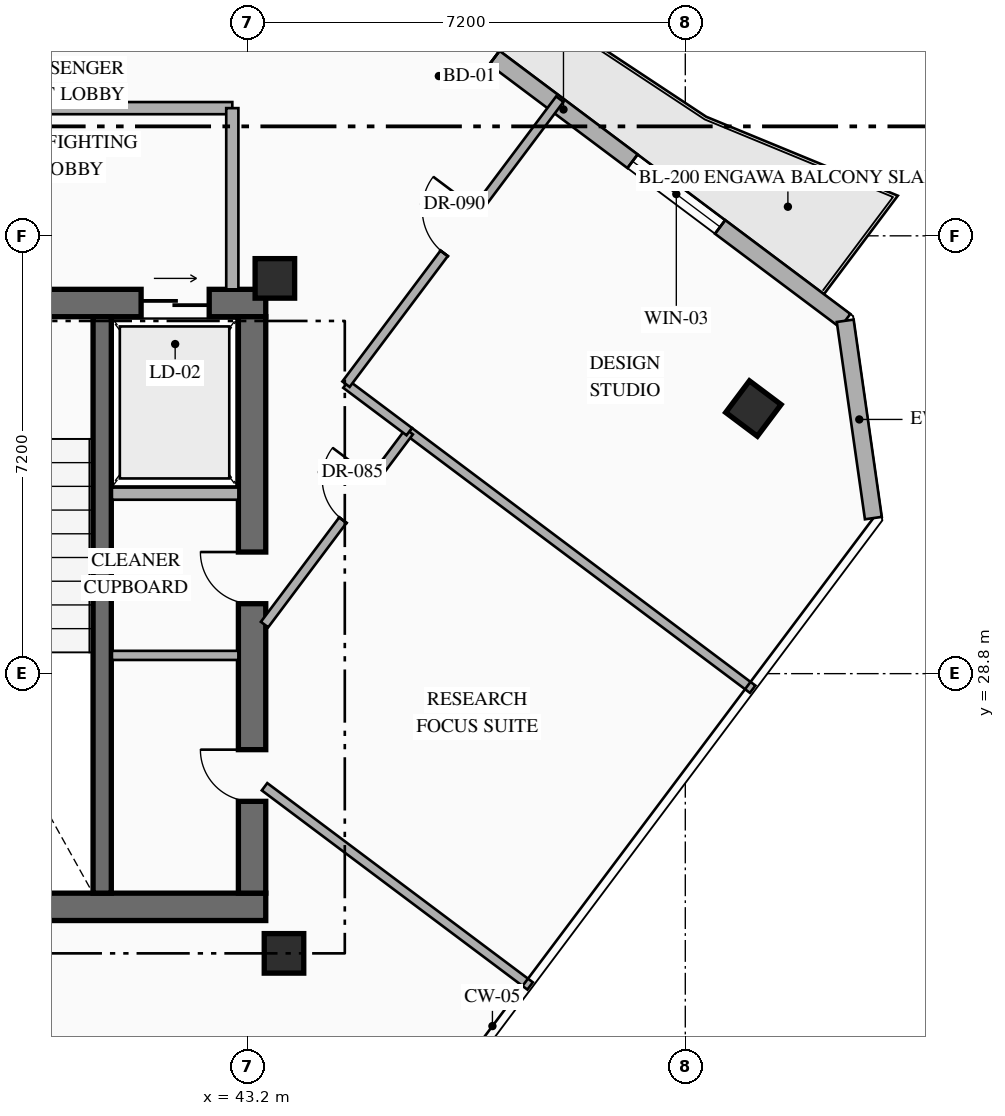
"""IFC4 building model, lengths in metres.
Left out: names, types, materials, properties, quantities, classifications, styles, units other than length and angle.
Written with IfcOpenShell. Run it as: python <this file> out.ifc"""

import sys

from ifc_helpers import new_model, si_unit, direction, frame, frame_2d, origin, origin_2d, place, context, subcontext, project, spatial, rectangle, hollow_rectangle, extrude, element, fill, save


model = new_model("IFC4")
c1 = context("Model", 3, precision=1e-05, world=origin(), true_north=direction((0.0, 1.0)))
c2 = subcontext(c1, "Body", "Model", "MODEL_VIEW")
j1 = project(units=[si_unit("LENGTHUNIT", "METRE"), si_unit("PLANEANGLEUNIT", "RADIAN")], contexts=[c1])
p1 = place(None, origin())
s1 = spatial("IfcSite", under=j1, at=p1, CompositionType="ELEMENT")
p2 = place(p1, origin())
s2 = spatial("IfcBuilding", under=s1, at=p2, CompositionType="ELEMENT")
p3 = place(p2, frame((0.0, 0.0, 253.95)))
s3 = spatial("IfcBuildingStorey", under=s2, at=p3, CompositionType="ELEMENT", Elevation=253.95)
p4 = place(p3, frame((36.04, 24.965, 0.0), z_axis=(0.0, 0.0, 1.0), x_axis=(1.0, 0.0, 0.0)))
e1 = element("IfcWall", 1, at=p4, inside=s3, PredefinedType="SHEAR", context=c2, shape_type="SweptSolid", body=[
    extrude(rectangle(XDim=7.46, YDim=0.45, at=frame_2d((3.73, 0.0))), origin(), (0.0, 0.0, 1.0), 3.6),
])
p5 = place(p3, frame((36.04, 34.895, 0.0), z_axis=(0.0, 0.0, 1.0), x_axis=(1.0, 0.0, 0.0)))
e2 = element("IfcWall", 2, at=p5, inside=s3, PredefinedType="SHEAR", context=c2, shape_type="SweptSolid", body=[
    extrude(rectangle(XDim=7.46, YDim=0.45, at=frame_2d((3.73, 0.0))), origin(), (0.0, 0.0, 1.0), 3.6),
])
p6 = place(p5, frame((2.51, 0.0, 0.0)))
e3 = element("IfcOpeningElement", 3, at=p6, cuts=e2, PredefinedType="OPENING", context=c2, shape_type="SweptSolid", body=[
    extrude(rectangle(XDim=1.1, YDim=2.2, at=frame_2d((0.55, 1.1))), frame((0.0, 0.235, 0.0), z_axis=(0.0, -1.0, 0.0), x_axis=(1.0, 0.0, 0.0)), (0.0, 0.0, 1.0), 0.47),
])
p7 = place(p5, frame((5.41, 0.0, 0.0)))
e4 = element("IfcOpeningElement", 4, at=p7, cuts=e2, PredefinedType="OPENING", context=c2, shape_type="SweptSolid", body=[
    extrude(rectangle(XDim=1.12, YDim=2.15, at=frame_2d((0.56, 1.075))), frame((0.0, 0.235, 0.0), z_axis=(0.0, -1.0, 0.0), x_axis=(1.0, 0.0, 0.0)), (0.0, 0.0, 1.0), 0.47),
])
p8 = place(p3, frame((43.275, 25.19, 0.0), z_axis=(0.0, 0.0, 1.0), x_axis=(0.0, 1.0, 0.0)))
e5 = element("IfcWall", 5, at=p8, inside=s3, PredefinedType="SHEAR", context=c2, shape_type="SweptSolid", body=[
    extrude(rectangle(XDim=9.48, YDim=0.45, at=frame_2d((4.74, 0.0))), origin(), (0.0, 0.0, 1.0), 3.6),
])
p9 = place(p8, frame((1.51, 0.0, 0.0)))
e6 = element("IfcOpeningElement", 6, at=p9, cuts=e5, PredefinedType="OPENING", context=c2, shape_type="SweptSolid", body=[
    extrude(rectangle(XDim=0.85, YDim=2.08, at=frame_2d((0.425, 1.04))), frame((0.0, 0.235, 0.0), z_axis=(0.0, -1.0, 0.0), x_axis=(1.0, 0.0, 0.0)), (0.0, 0.0, 1.0), 0.47),
])
p10 = place(p8, frame((4.76, 0.0, 0.0)))
e7 = element("IfcOpeningElement", 7, at=p10, cuts=e5, PredefinedType="OPENING", context=c2, shape_type="SweptSolid", body=[
    extrude(rectangle(XDim=0.85, YDim=2.08, at=frame_2d((0.425, 1.04))), frame((0.0, 0.235, 0.0), z_axis=(0.0, -1.0, 0.0), x_axis=(1.0, 0.0, 0.0)), (0.0, 0.0, 1.0), 0.47),
])
p11 = place(p3, frame((40.81, 25.19, 0.0), z_axis=(0.0, 0.0, 1.0), x_axis=(0.0, 1.0, 0.0)))
e8 = element("IfcWall", 8, at=p11, inside=s3, PredefinedType="SHEAR", context=c2, shape_type="SweptSolid", body=[
    extrude(rectangle(XDim=9.48, YDim=0.3, at=frame_2d((4.74, 0.0))), origin(), (0.0, 0.0, 1.0), 3.6),
])
for number, where, z_axis, x_axis in (
    (9, (43.8, 24.2, 0.0), (0.0, 0.0, 1.0), (1.0, 0.0, 0.0)),
    (10, (43.65, 35.3, 0.0), (0.0, 0.0, 1.0), (1.0, 0.0, 0.0)),
    (11, (51.52, 33.16, 0.0), (0.0, 0.0, 1.0), (0.8, -0.6, 0.0)),
):
    element("IfcColumn", number, at=place(p3, frame(where, z_axis=z_axis, x_axis=x_axis)), inside=s3, PredefinedType="COLUMN", context=c2, shape_type="SweptSolid", body=[
        extrude(hollow_rectangle(XDim=0.65, YDim=0.65, WallThickness=0.025, at=origin_2d()), origin(), (0.0, 0.0, 1.0), 3.6),
    ])
p12 = place(p3, frame((44.86, 40.73, 0.0), z_axis=(0.0, 0.0, 1.0), x_axis=(0.800022950109, -0.599969398635, 0.0)))
e12 = element("IfcWall", 12, at=p12, inside=s3, PredefinedType="STANDARD", context=c2, shape_type="SweptSolid", body=[
    extrude(rectangle(XDim=10.212, YDim=0.28, at=frame_2d((5.106, 0.0))), origin(), (0.0, 0.0, 1.0), 3.35),
])
p13 = place(p12, frame((1.901, 0.0, 0.0)))
e13 = element("IfcOpeningElement", 13, at=p13, cuts=e12, PredefinedType="OPENING", context=c2, shape_type="SweptSolid", body=[
    extrude(rectangle(XDim=1.1, YDim=2.2, at=frame_2d((0.55, 1.1))), frame((0.0, 0.15, 0.0), z_axis=(0.0, -1.0, 0.0), x_axis=(1.0, 0.0, 0.0)), (0.0, 0.0, 1.0), 0.3),
])
p14 = place(p12, frame((5.84, 0.0, 0.85)))
e14 = element("IfcOpeningElement", 14, at=p14, cuts=e12, PredefinedType="OPENING", context=c2, shape_type="SweptSolid", body=[
    extrude(rectangle(XDim=1.8, YDim=2.1, at=frame_2d((0.9, 1.05))), frame((0.0, 0.15, 0.0), z_axis=(0.0, -1.0, 0.0), x_axis=(1.0, 0.0, 0.0)), (0.0, 0.0, 1.0), 0.3),
])
p15 = place(p3, frame((53.03, 34.603, 0.0), z_axis=(0.0, 0.0, 1.0), x_axis=(0.141212810973, -0.989979263428, 0.0)))
e15 = element("IfcWall", 15, at=p15, inside=s3, PredefinedType="STANDARD", context=c2, shape_type="SweptSolid", body=[
    extrude(rectangle(XDim=3.278, YDim=0.28, at=frame_2d((1.639, 0.0))), origin(), (0.0, 0.0, 1.0), 3.35),
])
p16 = place(p3, frame((40.97, 31.76, 0.0), z_axis=(0.0, 0.0, 1.0), x_axis=(1.0, 0.0, 0.0)))
e16 = element("IfcWall", 16, at=p16, inside=s3, PredefinedType="STANDARD", context=c2, shape_type="SweptSolid", body=[
    extrude(rectangle(XDim=2.08, YDim=0.2, at=frame_2d((1.04, 0.0))), origin(), (0.0, 0.0, 1.0), 3.35),
])
p17 = place(p3, frame((40.97, 29.1, 0.0), z_axis=(0.0, 0.0, 1.0), x_axis=(1.0, 0.0, 0.0)))
e17 = element("IfcWall", 17, at=p17, inside=s3, PredefinedType="PARTITIONING", context=c2, shape_type="SweptSolid", body=[
    extrude(rectangle(XDim=2.08, YDim=0.15, at=frame_2d((1.04, 0.0))), origin(), (0.0, 0.0, 1.0), 3.35),
])
p18 = place(p3, frame((37.65, 38.1, 0.0), z_axis=(0.0, 0.0, 1.0), x_axis=(1.0, 0.0, 0.0)))
e18 = element("IfcWall", 18, at=p18, inside=s3, PredefinedType="STANDARD", context=c2, shape_type="SweptSolid", body=[
    extrude(rectangle(XDim=5.3, YDim=0.2, at=frame_2d((2.65, 0.0))), origin(), (0.0, 0.0, 1.0), 3.35),
])
p19 = place(p3, frame((42.95, 35.12, 0.0), z_axis=(0.0, 0.0, 1.0), x_axis=(0.0, 1.0, 0.0)))
e19 = element("IfcWall", 19, at=p19, inside=s3, PredefinedType="STANDARD", context=c2, shape_type="SweptSolid", body=[
    extrude(rectangle(XDim=2.98, YDim=0.2, at=frame_2d((1.49, 0.0))), origin(), (0.0, 0.0, 1.0), 3.35),
])
p20 = place(p3, frame((43.48, 26.94, 0.0), z_axis=(0.0, 0.0, 1.0), x_axis=(0.80000536583, -0.599992845493, 0.0)))
e20 = element("IfcWall", 20, at=p20, inside=s3, PredefinedType="PARTITIONING", context=c2, shape_type="SweptSolid", body=[
    extrude(rectangle(XDim=5.46, YDim=0.15, at=frame_2d((2.73, 0.0))), origin(), (0.0, 0.0, 1.0), 3.35),
])
p21 = place(p3, frame((45.86, 32.78, 0.0), z_axis=(0.0, 0.0, 1.0), x_axis=(0.799991700537, -0.600011065791, 0.0)))
e21 = element("IfcWall", 21, at=p21, inside=s3, PredefinedType="PARTITIONING", context=c2, shape_type="SweptSolid", body=[
    extrude(rectangle(XDim=7.06, YDim=0.15, at=frame_2d((3.53, 0.0))), origin(), (0.0, 0.0, 1.0), 3.35),
])
p22 = place(p3, frame((43.48, 29.607, 0.0), z_axis=(0.0, 0.0, 1.0), x_axis=(0.600049238723, 0.79996306859, 0.0)))
e22 = element("IfcWall", 22, at=p22, inside=s3, PredefinedType="PARTITIONING", context=c2, shape_type="SweptSolid", body=[
    extrude(rectangle(XDim=3.967, YDim=0.15, at=frame_2d((1.983, 0.0))), origin(), (0.0, 0.0, 1.0), 3.35),
])
p23 = place(p22, frame((2.147, 0.0, 0.0)))
e23 = element("IfcOpeningElement", 23, at=p23, cuts=e22, PredefinedType="OPENING", context=c2, shape_type="SweptSolid", body=[
    extrude(rectangle(XDim=0.85, YDim=2.08, at=frame_2d((0.425, 1.04))), frame((0.0, 0.085, 0.0), z_axis=(0.0, -1.0, 0.0), x_axis=(1.0, 0.0, 0.0)), (0.0, 0.0, 1.0), 0.17),
])
p24 = place(p3, frame((44.82, 33.56, 0.0), z_axis=(0.0, 0.0, 1.0), x_axis=(0.8, -0.6, 0.0)))
e24 = element("IfcWall", 24, at=p24, inside=s3, PredefinedType="PARTITIONING", context=c2, shape_type="SweptSolid", body=[
    extrude(rectangle(XDim=1.3, YDim=0.15, at=frame_2d((0.65, 0.0))), origin(), (0.0, 0.0, 1.0), 3.35),
])
p25 = place(p3, frame((44.82, 33.56, 0.0), z_axis=(0.0, 0.0, 1.0), x_axis=(0.599986667805, 0.800009998972, 0.0)))
e25 = element("IfcWall", 25, at=p25, inside=s3, PredefinedType="PARTITIONING", context=c2, shape_type="SweptSolid", body=[
    extrude(rectangle(XDim=5.86, YDim=0.15, at=frame_2d((2.93, 0.0))), origin(), (0.0, 0.0, 1.0), 3.35),
])
p26 = place(p25, frame((2.69, 0.0, 0.0)))
e26 = element("IfcOpeningElement", 26, at=p26, cuts=e25, PredefinedType="OPENING", context=c2, shape_type="SweptSolid", body=[
    extrude(rectangle(XDim=0.9, YDim=2.15, at=frame_2d((0.45, 1.075))), frame((0.0, 0.085, 0.0), z_axis=(0.0, -1.0, 0.0), x_axis=(1.0, 0.0, 0.0)), (0.0, 0.0, 1.0), 0.17),
])
p27 = place(p3, frame((27.91, 26.68, 0.0), z_axis=(0.0, 0.0, 1.0), x_axis=(0.8, -0.6, 0.0)))
e27 = element("IfcWall", 27, at=p27, inside=s3, PredefinedType="PARTITIONING", context=c2, shape_type="SweptSolid", body=[
    extrude(rectangle(XDim=17.76, YDim=0.15, at=frame_2d((8.88, 0.0))), origin(), (0.0, 0.0, 1.0), 3.35),
])
p28 = place(p27, frame((11.294, 0.0, 0.0)))
e28 = element("IfcOpeningElement", 28, at=p28, cuts=e27, PredefinedType="OPENING", context=c2, shape_type="SweptSolid", body=[
    extrude(rectangle(XDim=0.95, YDim=2.15, at=frame_2d((0.475, 1.075))), frame((0.0, 0.085, 0.0), z_axis=(0.0, -1.0, 0.0), x_axis=(1.0, 0.0, 0.0)), (0.0, 0.0, 1.0), 0.17),
])
p29 = place(p13, origin())
e29 = element("IfcDoor", 29, at=p29, inside=s3, OperationType="SINGLE_SWING_LEFT", PredefinedType="DOOR", context=c2, shape_type="SweptSolid", body=[
    extrude(rectangle(XDim=1.1, YDim=2.2, at=frame_2d((0.55, 1.1))), frame((0.0, 0.025, 0.0), z_axis=(0.0, -1.0, 0.0), x_axis=(1.0, 0.0, 0.0)), (0.0, 0.0, 1.0), 0.05),
])
fill(e13, e29)
p30 = place(p14, origin())
e30 = element("IfcWindow", 30, at=p30, inside=s3, PartitioningType="SINGLE_PANEL", PredefinedType="WINDOW", context=c2, shape_type="SweptSolid", body=[
    extrude(rectangle(XDim=1.8, YDim=2.1, at=frame_2d((0.9, 1.05))), frame((0.0, 0.03, 0.0), z_axis=(0.0, -1.0, 0.0), x_axis=(1.0, 0.0, 0.0)), (0.0, 0.0, 1.0), 0.06),
])
fill(e14, e30)
p31 = place(p7, origin())
e31 = element("IfcDoor", 31, at=p31, inside=s3, OperationType="SLIDING_TO_RIGHT", PredefinedType="USERDEFINED", context=c2, shape_type="SweptSolid", body=[
    extrude(rectangle(XDim=1.12, YDim=2.15, at=frame_2d((0.56, 1.075))), frame((0.0, 0.025, 0.0), z_axis=(0.0, -1.0, 0.0), x_axis=(1.0, 0.0, 0.0)), (0.0, 0.0, 1.0), 0.05),
])
fill(e4, e31)
p32 = place(p9, origin())
e32 = element("IfcDoor", 32, at=p32, inside=s3, OperationType="SINGLE_SWING_RIGHT", PredefinedType="DOOR", context=c2, shape_type="SweptSolid", body=[
    extrude(rectangle(XDim=0.85, YDim=2.08, at=frame_2d((0.425, 1.04))), frame((0.0, 0.025, 0.0), z_axis=(0.0, -1.0, 0.0), x_axis=(1.0, 0.0, 0.0)), (0.0, 0.0, 1.0), 0.05),
])
fill(e6, e32)
p33 = place(p10, origin())
e33 = element("IfcDoor", 33, at=p33, inside=s3, OperationType="SINGLE_SWING_RIGHT", PredefinedType="DOOR", context=c2, shape_type="SweptSolid", body=[
    extrude(rectangle(XDim=0.85, YDim=2.08, at=frame_2d((0.425, 1.04))), frame((0.0, 0.025, 0.0), z_axis=(0.0, -1.0, 0.0), x_axis=(1.0, 0.0, 0.0)), (0.0, 0.0, 1.0), 0.05),
])
fill(e7, e33)
p34 = place(p23, origin())
e34 = element("IfcDoor", 34, at=p34, inside=s3, OperationType="SINGLE_SWING_RIGHT", PredefinedType="DOOR", context=c2, shape_type="SweptSolid", body=[
    extrude(rectangle(XDim=0.85, YDim=2.08, at=frame_2d((0.425, 1.04))), frame((0.0, 0.025, 0.0), z_axis=(0.0, -1.0, 0.0), x_axis=(1.0, 0.0, 0.0)), (0.0, 0.0, 1.0), 0.05),
])
fill(e23, e34)
p35 = place(p26, origin())
e35 = element("IfcDoor", 35, at=p35, inside=s3, OperationType="SINGLE_SWING_RIGHT", PredefinedType="DOOR", context=c2, shape_type="SweptSolid", body=[
    extrude(rectangle(XDim=0.9, YDim=2.15, at=frame_2d((0.45, 1.075))), frame((0.0, 0.025, 0.0), z_axis=(0.0, -1.0, 0.0), x_axis=(1.0, 0.0, 0.0)), (0.0, 0.0, 1.0), 0.05),
])
fill(e26, e35)
save(model, sys.argv[1])
